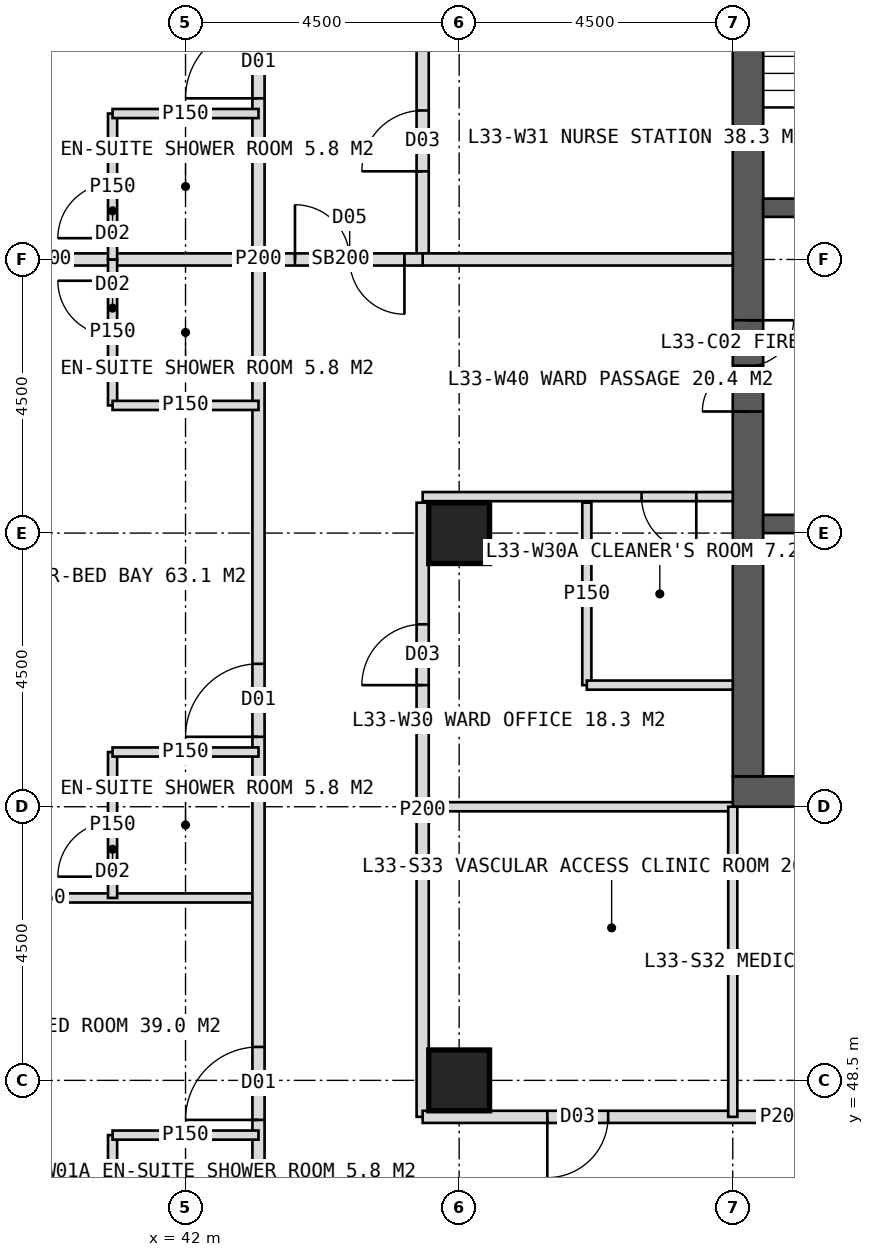
"""IFC4 building model, lengths in metres.
Left out: names, types, materials, properties, quantities, classifications, styles, units other than length and angle.
Written with IfcOpenShell. Run it as: python <this file> out.ifc"""

import sys

from ifc_helpers import new_model, si_unit, direction, frame, frame_2d, origin, origin_2d, place, context, subcontext, project, spatial, rectangle, hollow_rectangle, extrude, element, fill, save


model = new_model("IFC4")
c1 = context("Model", 3, precision=1e-05, world=origin(), true_north=direction((0.0, 1.0)))
c2 = subcontext(c1, "Body", "Model", "MODEL_VIEW")
j1 = project(units=[si_unit("LENGTHUNIT", "METRE"), si_unit("PLANEANGLEUNIT", "RADIAN")], contexts=[c1])
p1 = place(None, origin())
s1 = spatial("IfcSite", under=j1, at=p1, CompositionType="ELEMENT")
p2 = place(p1, origin())
s2 = spatial("IfcBuilding", under=s1, at=p2, CompositionType="ELEMENT")
p3 = place(p2, frame((0.0, 0.0, 140.0)))
s3 = spatial("IfcBuildingStorey", under=s2, at=p3, CompositionType="ELEMENT", Elevation=140.0)
p4 = place(p3, frame((51.0, 53.25, 0.0), z_axis=(0.0, 0.0, 1.0), x_axis=(1.0, 0.0, 0.0)))
e1 = element("IfcWall", 1, at=p4, inside=s3, PredefinedType="SHEAR", context=c2, shape_type="SweptSolid", body=[
    extrude(rectangle(XDim=18.0, YDim=0.5, at=frame_2d((9.0, 0.0))), origin(), (0.0, 0.0, 1.0), 4.0),
])
p5 = place(p4, frame((8.1, 0.0, 0.0)))
e2 = element("IfcOpeningElement", 2, at=p5, cuts=e1, PredefinedType="OPENING", context=c2, shape_type="SweptSolid", body=[
    extrude(rectangle(XDim=1.8, YDim=2.2, at=frame_2d((0.9, 1.1))), frame((0.0, 0.26, 0.0), z_axis=(0.0, -1.0, 0.0), x_axis=(1.0, 0.0, 0.0)), (0.0, 0.0, 1.0), 0.52),
])
p6 = place(p3, frame((51.25, 53.5, 0.0), z_axis=(0.0, 0.0, 1.0), x_axis=(0.0, 1.0, 0.0)))
e3 = element("IfcWall", 3, at=p6, inside=s3, PredefinedType="SHEAR", context=c2, shape_type="SweptSolid", body=[
    extrude(rectangle(XDim=17.0, YDim=0.5, at=frame_2d((8.5, 0.0))), origin(), (0.0, 0.0, 1.0), 4.0),
])
p7 = place(p6, frame((6.0, 0.0, 0.0)))
e4 = element("IfcOpeningElement", 4, at=p7, cuts=e3, PredefinedType="OPENING", context=c2, shape_type="SweptSolid", body=[
    extrude(rectangle(XDim=1.5, YDim=2.2, at=frame_2d((0.75, 1.1))), frame((0.0, 0.26, 0.0), z_axis=(0.0, -1.0, 0.0), x_axis=(1.0, 0.0, 0.0)), (0.0, 0.0, 1.0), 0.52),
])
p8 = place(p3, frame((51.5, 62.85, 0.0), z_axis=(0.0, 0.0, 1.0), x_axis=(1.0, 0.0, 0.0)))
e5 = element("IfcWall", 5, at=p8, inside=s3, PredefinedType="SHEAR", context=c2, shape_type="SweptSolid", body=[
    extrude(rectangle(XDim=3.3, YDim=0.3, at=frame_2d((1.65, 0.0))), origin(), (0.0, 0.0, 1.0), 4.0),
])
p9 = place(p8, frame((1.05, 0.0, 0.0)))
e6 = element("IfcOpeningElement", 6, at=p9, cuts=e5, PredefinedType="OPENING", context=c2, shape_type="SweptSolid", body=[
    extrude(rectangle(XDim=1.2, YDim=2.1, at=frame_2d((0.6, 1.05))), frame((0.0, 0.16, 0.0), z_axis=(0.0, -1.0, 0.0), x_axis=(1.0, 0.0, 0.0)), (0.0, 0.0, 1.0), 0.32),
])
p10 = place(p3, frame((51.5, 57.65, 0.0), z_axis=(0.0, 0.0, 1.0), x_axis=(1.0, 0.0, 0.0)))
e7 = element("IfcWall", 7, at=p10, inside=s3, PredefinedType="SHEAR", context=c2, shape_type="SweptSolid", body=[
    extrude(rectangle(XDim=3.3, YDim=0.3, at=frame_2d((1.65, 0.0))), origin(), (0.0, 0.0, 1.0), 4.0),
])
p11 = place(p10, frame((1.05, 0.0, 0.0)))
e8 = element("IfcOpeningElement", 8, at=p11, cuts=e7, PredefinedType="OPENING", context=c2, shape_type="SweptSolid", body=[
    extrude(rectangle(XDim=1.2, YDim=2.2, at=frame_2d((0.6, 1.1))), frame((0.0, 0.16, 0.0), z_axis=(0.0, -1.0, 0.0), x_axis=(1.0, 0.0, 0.0)), (0.0, 0.0, 1.0), 0.32),
])
for number, where, z_axis, x_axis in (
    (9, (46.5, 48.5, 0.0), (0.0, 0.0, 1.0), (1.0, 0.0, 0.0)),
    (10, (46.5, 57.5, 0.0), (0.0, 0.0, 1.0), (1.0, 0.0, 0.0)),
):
    element("IfcColumn", number, at=place(p3, frame(where, z_axis=z_axis, x_axis=x_axis)), inside=s3, PredefinedType="COLUMN", context=c2, shape_type="SweptSolid", body=[
        extrude(hollow_rectangle(XDim=1.0, YDim=1.0, WallThickness=0.1, at=origin_2d()), origin(), (0.0, 0.0, 1.0), 4.0),
    ])
p12 = place(p3, frame((43.2, 51.5, 0.0), z_axis=(0.0, 0.0, 1.0), x_axis=(-1.0, 0.0, 0.0)))
e11 = element("IfcWall", 11, at=p12, inside=s3, PredefinedType="PARTITIONING", context=c2, shape_type="SweptSolid", body=[
    extrude(rectangle(XDim=7.11, YDim=0.15, at=frame_2d((3.555, 0.0))), origin(), (0.0, 0.0, 1.0), 3.75),
])
p13 = place(p3, frame((43.2, 62.0, 0.0), z_axis=(0.0, 0.0, 1.0), x_axis=(-1.0, 0.0, 0.0)))
e12 = element("IfcWall", 12, at=p13, inside=s3, PredefinedType="SOLIDWALL", context=c2, shape_type="SweptSolid", body=[
    extrude(rectangle(XDim=7.11, YDim=0.2, at=frame_2d((3.555, 0.0))), origin(), (0.0, 0.0, 1.0), 2.95),
])
p14 = place(p3, frame((43.2, 45.2, 0.0), z_axis=(0.0, 0.0, 1.0), x_axis=(0.0, 1.0, 0.0)))
e13 = element("IfcWall", 13, at=p14, inside=s3, PredefinedType="PARTITIONING", context=c2, shape_type="SweptSolid", body=[
    extrude(rectangle(XDim=33.6, YDim=0.2, at=frame_2d((16.8, 0.0))), origin(), (0.0, 0.0, 1.0), 3.75),
])
p15 = place(p14, frame((2.65, 0.0, 0.0)))
e14 = element("IfcOpeningElement", 14, at=p15, cuts=e13, PredefinedType="OPENING", context=c2, shape_type="SweptSolid", body=[
    extrude(rectangle(XDim=1.2, YDim=2.2, at=frame_2d((0.6, 1.1))), frame((0.0, 0.11, 0.0), z_axis=(0.0, -1.0, 0.0), x_axis=(1.0, 0.0, 0.0)), (0.0, 0.0, 1.0), 0.22),
])
p16 = place(p14, frame((8.95, 0.0, 0.0)))
e15 = element("IfcOpeningElement", 15, at=p16, cuts=e13, PredefinedType="OPENING", context=c2, shape_type="SweptSolid", body=[
    extrude(rectangle(XDim=1.2, YDim=2.2, at=frame_2d((0.6, 1.1))), frame((0.0, 0.11, 0.0), z_axis=(0.0, -1.0, 0.0), x_axis=(1.0, 0.0, 0.0)), (0.0, 0.0, 1.0), 0.22),
])
p17 = place(p14, frame((19.45, 0.0, 0.0)))
e16 = element("IfcOpeningElement", 16, at=p17, cuts=e13, PredefinedType="OPENING", context=c2, shape_type="SweptSolid", body=[
    extrude(rectangle(XDim=1.2, YDim=2.2, at=frame_2d((0.6, 1.1))), frame((0.0, 0.11, 0.0), z_axis=(0.0, -1.0, 0.0), x_axis=(1.0, 0.0, 0.0)), (0.0, 0.0, 1.0), 0.22),
])
p18 = place(p14, frame((28.45, 0.0, 0.0)))
e17 = element("IfcOpeningElement", 17, at=p18, cuts=e13, PredefinedType="OPENING", context=c2, shape_type="SweptSolid", body=[
    extrude(rectangle(XDim=1.2, YDim=2.2, at=frame_2d((0.6, 1.1))), frame((0.0, 0.11, 0.0), z_axis=(0.0, -1.0, 0.0), x_axis=(1.0, 0.0, 0.0)), (0.0, 0.0, 1.0), 0.22),
])
p19 = place(p3, frame((40.8, 45.2, 0.0), z_axis=(0.0, 0.0, 1.0), x_axis=(0.0, 1.0, 0.0)))
e18 = element("IfcWall", 18, at=p19, inside=s3, PredefinedType="PARTITIONING", context=c2, shape_type="SweptSolid", body=[
    extrude(rectangle(XDim=2.4, YDim=0.15, at=frame_2d((1.2, 0.0))), origin(), (0.0, 0.0, 1.0), 2.997),
])
p20 = place(p19, frame((0.35, 0.0, 0.0)))
e19 = element("IfcOpeningElement", 19, at=p20, cuts=e18, PredefinedType="OPENING", context=c2, shape_type="SweptSolid", body=[
    extrude(rectangle(XDim=0.9, YDim=2.1, at=frame_2d((0.45, 1.05))), frame((0.0, 0.085, 0.0), z_axis=(0.0, -1.0, 0.0), x_axis=(1.0, 0.0, 0.0)), (0.0, 0.0, 1.0), 0.17),
])
p21 = place(p3, frame((43.2, 47.6, 0.0), z_axis=(0.0, 0.0, 1.0), x_axis=(-1.0, 0.0, 0.0)))
e20 = element("IfcWall", 20, at=p21, inside=s3, PredefinedType="PARTITIONING", context=c2, shape_type="SweptSolid", body=[
    extrude(rectangle(XDim=2.4, YDim=0.15, at=frame_2d((1.2, 0.0))), origin(), (0.0, 0.0, 1.0), 3.75),
])
p22 = place(p3, frame((40.8, 51.5, 0.0), z_axis=(0.0, 0.0, 1.0), x_axis=(0.0, 1.0, 0.0)))
e21 = element("IfcWall", 21, at=p22, inside=s3, PredefinedType="PARTITIONING", context=c2, shape_type="SweptSolid", body=[
    extrude(rectangle(XDim=2.4, YDim=0.15, at=frame_2d((1.2, 0.0))), origin(), (0.0, 0.0, 1.0), 3.75),
])
p23 = place(p22, frame((0.35, 0.0, 0.0)))
e22 = element("IfcOpeningElement", 22, at=p23, cuts=e21, PredefinedType="OPENING", context=c2, shape_type="SweptSolid", body=[
    extrude(rectangle(XDim=0.9, YDim=2.1, at=frame_2d((0.45, 1.05))), frame((0.0, 0.085, 0.0), z_axis=(0.0, -1.0, 0.0), x_axis=(1.0, 0.0, 0.0)), (0.0, 0.0, 1.0), 0.17),
])
p24 = place(p3, frame((43.2, 53.9, 0.0), z_axis=(0.0, 0.0, 1.0), x_axis=(-1.0, 0.0, 0.0)))
e23 = element("IfcWall", 23, at=p24, inside=s3, PredefinedType="PARTITIONING", context=c2, shape_type="SweptSolid", body=[
    extrude(rectangle(XDim=2.4, YDim=0.15, at=frame_2d((1.2, 0.0))), origin(), (0.0, 0.0, 1.0), 3.75),
])
p25 = place(p3, frame((40.8, 59.6, 0.0), z_axis=(0.0, 0.0, 1.0), x_axis=(0.0, 1.0, 0.0)))
e24 = element("IfcWall", 24, at=p25, inside=s3, PredefinedType="PARTITIONING", context=c2, shape_type="SweptSolid", body=[
    extrude(rectangle(XDim=2.4, YDim=0.15, at=frame_2d((1.2, 0.0))), origin(), (0.0, 0.0, 1.0), 3.75),
])
p26 = place(p25, frame((1.15, 0.0, 0.0)))
e25 = element("IfcOpeningElement", 25, at=p26, cuts=e24, PredefinedType="OPENING", context=c2, shape_type="SweptSolid", body=[
    extrude(rectangle(XDim=0.9, YDim=2.1, at=frame_2d((0.45, 1.05))), frame((0.0, 0.085, 0.0), z_axis=(0.0, -1.0, 0.0), x_axis=(1.0, 0.0, 0.0)), (0.0, 0.0, 1.0), 0.17),
])
p27 = place(p3, frame((43.2, 59.6, 0.0), z_axis=(0.0, 0.0, 1.0), x_axis=(-1.0, 0.0, 0.0)))
e26 = element("IfcWall", 26, at=p27, inside=s3, PredefinedType="PARTITIONING", context=c2, shape_type="SweptSolid", body=[
    extrude(rectangle(XDim=2.4, YDim=0.15, at=frame_2d((1.2, 0.0))), origin(), (0.0, 0.0, 1.0), 3.75),
])
p28 = place(p3, frame((40.8, 62.0, 0.0), z_axis=(0.0, 0.0, 1.0), x_axis=(0.0, 1.0, 0.0)))
e27 = element("IfcWall", 27, at=p28, inside=s3, PredefinedType="PARTITIONING", context=c2, shape_type="SweptSolid", body=[
    extrude(rectangle(XDim=2.4, YDim=0.15, at=frame_2d((1.2, 0.0))), origin(), (0.0, 0.0, 1.0), 3.75),
])
p29 = place(p28, frame((0.35, 0.0, 0.0)))
e28 = element("IfcOpeningElement", 28, at=p29, cuts=e27, PredefinedType="OPENING", context=c2, shape_type="SweptSolid", body=[
    extrude(rectangle(XDim=0.9, YDim=2.1, at=frame_2d((0.45, 1.05))), frame((0.0, 0.085, 0.0), z_axis=(0.0, -1.0, 0.0), x_axis=(1.0, 0.0, 0.0)), (0.0, 0.0, 1.0), 0.17),
])
p30 = place(p3, frame((43.2, 64.4, 0.0), z_axis=(0.0, 0.0, 1.0), x_axis=(-1.0, 0.0, 0.0)))
e29 = element("IfcWall", 29, at=p30, inside=s3, PredefinedType="PARTITIONING", context=c2, shape_type="SweptSolid", body=[
    extrude(rectangle(XDim=2.4, YDim=0.15, at=frame_2d((1.2, 0.0))), origin(), (0.0, 0.0, 1.0), 3.75),
])
p31 = place(p3, frame((51.0, 53.0, 0.0), z_axis=(0.0, 0.0, 1.0), x_axis=(-1.0, 0.0, 0.0)))
e30 = element("IfcWall", 30, at=p31, inside=s3, PredefinedType="PARTITIONING", context=c2, shape_type="SweptSolid", body=[
    extrude(rectangle(XDim=5.1, YDim=0.15, at=frame_2d((2.55, 0.0))), origin(), (0.0, 0.0, 1.0), 3.75),
])
p32 = place(p3, frame((45.9, 47.9, 0.0), z_axis=(0.0, 0.0, 1.0), x_axis=(0.0, 1.0, 0.0)))
e31 = element("IfcWall", 31, at=p32, inside=s3, PredefinedType="PARTITIONING", context=c2, shape_type="SweptSolid", body=[
    extrude(rectangle(XDim=10.1, YDim=0.2, at=frame_2d((5.05, 0.0))), origin(), (0.0, 0.0, 1.0), 3.75),
])
p33 = place(p32, frame((7.1, 0.0, 0.0)))
e32 = element("IfcOpeningElement", 32, at=p33, cuts=e31, PredefinedType="OPENING", context=c2, shape_type="SweptSolid", body=[
    extrude(rectangle(XDim=1.0, YDim=2.1, at=frame_2d((0.5, 1.05))), frame((0.0, 0.11, 0.0), z_axis=(0.0, -1.0, 0.0), x_axis=(1.0, 0.0, 0.0)), (0.0, 0.0, 1.0), 0.22),
])
p34 = place(p3, frame((45.9, 62.0, 0.0), z_axis=(0.0, 0.0, 1.0), x_axis=(0.0, 1.0, 0.0)))
e33 = element("IfcWall", 33, at=p34, inside=s3, PredefinedType="PARTITIONING", context=c2, shape_type="SweptSolid", body=[
    extrude(rectangle(XDim=14.1, YDim=0.2, at=frame_2d((7.05, 0.0))), origin(), (0.0, 0.0, 1.0), 3.75),
])
p35 = place(p34, frame((1.45, 0.0, 0.0)))
e34 = element("IfcOpeningElement", 34, at=p35, cuts=e33, PredefinedType="OPENING", context=c2, shape_type="SweptSolid", body=[
    extrude(rectangle(XDim=1.0, YDim=2.1, at=frame_2d((0.5, 1.05))), frame((0.0, 0.11, 0.0), z_axis=(0.0, -1.0, 0.0), x_axis=(1.0, 0.0, 0.0)), (0.0, 0.0, 1.0), 0.22),
])
p36 = place(p34, frame((10.3, 0.0, 0.0)))
e35 = element("IfcOpeningElement", 35, at=p36, cuts=e33, PredefinedType="OPENING", context=c2, shape_type="SweptSolid", body=[
    extrude(rectangle(XDim=1.0, YDim=2.1, at=frame_2d((0.5, 1.05))), frame((0.0, 0.11, 0.0), z_axis=(0.0, -1.0, 0.0), x_axis=(1.0, 0.0, 0.0)), (0.0, 0.0, 1.0), 0.22),
])
p37 = place(p3, frame((51.0, 58.1, 0.0), z_axis=(0.0, 0.0, 1.0), x_axis=(-1.0, 0.0, 0.0)))
e36 = element("IfcWall", 36, at=p37, inside=s3, PredefinedType="PARTITIONING", context=c2, shape_type="SweptSolid", body=[
    extrude(rectangle(XDim=5.1, YDim=0.15, at=frame_2d((2.55, 0.0))), origin(), (0.0, 0.0, 1.0), 3.75),
])
p38 = place(p37, frame((0.6, 0.0, 0.0)))
e37 = element("IfcOpeningElement", 37, at=p38, cuts=e36, PredefinedType="OPENING", context=c2, shape_type="SweptSolid", body=[
    extrude(rectangle(XDim=0.9, YDim=2.1, at=frame_2d((0.45, 1.05))), frame((0.0, 0.085, 0.0), z_axis=(0.0, -1.0, 0.0), x_axis=(1.0, 0.0, 0.0)), (0.0, 0.0, 1.0), 0.17),
])
p39 = place(p3, frame((51.0, 62.0, 0.0), z_axis=(0.0, 0.0, 1.0), x_axis=(-1.0, 0.0, 0.0)))
e38 = element("IfcWall", 38, at=p39, inside=s3, PredefinedType="SOLIDWALL", context=c2, shape_type="SweptSolid", body=[
    extrude(rectangle(XDim=5.1, YDim=0.2, at=frame_2d((2.55, 0.0))), origin(), (0.0, 0.0, 1.0), 2.95),
])
p40 = place(p3, frame((48.6, 55.0, 0.0), z_axis=(0.0, 0.0, 1.0), x_axis=(0.0, 1.0, 0.0)))
e39 = element("IfcWall", 39, at=p40, inside=s3, PredefinedType="PARTITIONING", context=c2, shape_type="SweptSolid", body=[
    extrude(rectangle(XDim=3.0, YDim=0.15, at=frame_2d((1.5, 0.0))), origin(), (0.0, 0.0, 1.0), 3.75),
])
p41 = place(p3, frame((51.0, 55.0, 0.0), z_axis=(0.0, 0.0, 1.0), x_axis=(-1.0, 0.0, 0.0)))
e40 = element("IfcWall", 40, at=p41, inside=s3, PredefinedType="PARTITIONING", context=c2, shape_type="SweptSolid", body=[
    extrude(rectangle(XDim=2.4, YDim=0.15, at=frame_2d((1.2, 0.0))), origin(), (0.0, 0.0, 1.0), 3.75),
])
p42 = place(p3, frame((57.75, 47.9, 0.0), z_axis=(0.0, 0.0, 1.0), x_axis=(-1.0, 0.0, 0.0)))
e41 = element("IfcWall", 41, at=p42, inside=s3, PredefinedType="PARTITIONING", context=c2, shape_type="SweptSolid", body=[
    extrude(rectangle(XDim=11.85, YDim=0.2, at=frame_2d((5.925, 0.0))), origin(), (0.0, 0.0, 1.0), 3.75),
])
p43 = place(p42, frame((0.325, 0.0, 0.0)))
e42 = element("IfcOpeningElement", 42, at=p43, cuts=e41, PredefinedType="OPENING", context=c2, shape_type="SweptSolid", body=[
    extrude(rectangle(XDim=1.0, YDim=2.1, at=frame_2d((0.5, 1.05))), frame((0.0, 0.11, 0.0), z_axis=(0.0, -1.0, 0.0), x_axis=(1.0, 0.0, 0.0)), (0.0, 0.0, 1.0), 0.22),
])
p44 = place(p42, frame((4.75, 0.0, 0.0)))
e43 = element("IfcOpeningElement", 43, at=p44, cuts=e41, PredefinedType="OPENING", context=c2, shape_type="SweptSolid", body=[
    extrude(rectangle(XDim=1.0, YDim=2.1, at=frame_2d((0.5, 1.05))), frame((0.0, 0.11, 0.0), z_axis=(0.0, -1.0, 0.0), x_axis=(1.0, 0.0, 0.0)), (0.0, 0.0, 1.0), 0.22),
])
p45 = place(p42, frame((8.8, 0.0, 0.0)))
e44 = element("IfcOpeningElement", 44, at=p45, cuts=e41, PredefinedType="OPENING", context=c2, shape_type="SweptSolid", body=[
    extrude(rectangle(XDim=1.0, YDim=2.1, at=frame_2d((0.5, 1.05))), frame((0.0, 0.11, 0.0), z_axis=(0.0, -1.0, 0.0), x_axis=(1.0, 0.0, 0.0)), (0.0, 0.0, 1.0), 0.22),
])
p46 = place(p3, frame((51.0, 53.0, 0.0), z_axis=(0.0, 0.0, 1.0), x_axis=(0.0, -1.0, 0.0)))
e45 = element("IfcWall", 45, at=p46, inside=s3, PredefinedType="PARTITIONING", context=c2, shape_type="SweptSolid", body=[
    extrude(rectangle(XDim=5.1, YDim=0.15, at=frame_2d((2.55, 0.0))), origin(), (0.0, 0.0, 1.0), 3.75),
])
p47 = place(p3, frame((45.9, 62.0, 0.0), z_axis=(0.0, 0.0, 1.0), x_axis=(-1.0, 0.0, 0.0)))
e46 = element("IfcWall", 46, at=p47, inside=s3, PredefinedType="SOLIDWALL", context=c2, shape_type="SweptSolid", body=[
    extrude(rectangle(XDim=2.7, YDim=0.2, at=frame_2d((1.35, 0.0))), origin(), (0.0, 0.0, 1.0), 2.95),
])
p48 = place(p47, frame((0.3, 0.0, 0.0)))
e47 = element("IfcOpeningElement", 47, at=p48, cuts=e46, PredefinedType="OPENING", context=c2, shape_type="SweptSolid", body=[
    extrude(rectangle(XDim=1.8, YDim=2.2, at=frame_2d((0.9, 1.1))), frame((0.0, 0.11, 0.0), z_axis=(0.0, -1.0, 0.0), x_axis=(1.0, 0.0, 0.0)), (0.0, 0.0, 1.0), 0.22),
])
p49 = place(p15, origin())
e48 = element("IfcDoor", 48, at=p49, inside=s3, OperationType="SINGLE_SWING_LEFT", PredefinedType="DOOR", context=c2, shape_type="SweptSolid", body=[
    extrude(rectangle(XDim=1.2, YDim=2.2, at=frame_2d((0.6, 1.1))), frame((0.0, 0.025, 0.0), z_axis=(0.0, -1.0, 0.0), x_axis=(1.0, 0.0, 0.0)), (0.0, 0.0, 1.0), 0.05),
])
fill(e14, e48)
p50 = place(p16, origin())
e49 = element("IfcDoor", 49, at=p50, inside=s3, OperationType="SINGLE_SWING_LEFT", PredefinedType="DOOR", context=c2, shape_type="SweptSolid", body=[
    extrude(rectangle(XDim=1.2, YDim=2.2, at=frame_2d((0.6, 1.1))), frame((0.0, 0.025, 0.0), z_axis=(0.0, -1.0, 0.0), x_axis=(1.0, 0.0, 0.0)), (0.0, 0.0, 1.0), 0.05),
])
fill(e15, e49)
p51 = place(p23, origin())
e50 = element("IfcDoor", 50, at=p51, inside=s3, OperationType="SINGLE_SWING_LEFT", PredefinedType="DOOR", context=c2, shape_type="SweptSolid", body=[
    extrude(rectangle(XDim=0.9, YDim=2.1, at=frame_2d((0.45, 1.05))), frame((0.0, 0.025, 0.0), z_axis=(0.0, -1.0, 0.0), x_axis=(1.0, 0.0, 0.0)), (0.0, 0.0, 1.0), 0.05),
])
fill(e22, e50)
p52 = place(p26, origin())
e51 = element("IfcDoor", 51, at=p52, inside=s3, OperationType="SINGLE_SWING_RIGHT", PredefinedType="DOOR", context=c2, shape_type="SweptSolid", body=[
    extrude(rectangle(XDim=0.9, YDim=2.1, at=frame_2d((0.45, 1.05))), frame((0.0, 0.025, 0.0), z_axis=(0.0, -1.0, 0.0), x_axis=(1.0, 0.0, 0.0)), (0.0, 0.0, 1.0), 0.05),
])
fill(e25, e51)
p53 = place(p17, origin())
e52 = element("IfcDoor", 52, at=p53, inside=s3, OperationType="SINGLE_SWING_LEFT", PredefinedType="DOOR", context=c2, shape_type="SweptSolid", body=[
    extrude(rectangle(XDim=1.2, YDim=2.2, at=frame_2d((0.6, 1.1))), frame((0.0, 0.025, 0.0), z_axis=(0.0, -1.0, 0.0), x_axis=(1.0, 0.0, 0.0)), (0.0, 0.0, 1.0), 0.05),
])
fill(e16, e52)
p54 = place(p29, origin())
e53 = element("IfcDoor", 53, at=p54, inside=s3, OperationType="SINGLE_SWING_LEFT", PredefinedType="DOOR", context=c2, shape_type="SweptSolid", body=[
    extrude(rectangle(XDim=0.9, YDim=2.1, at=frame_2d((0.45, 1.05))), frame((0.0, 0.025, 0.0), z_axis=(0.0, -1.0, 0.0), x_axis=(1.0, 0.0, 0.0)), (0.0, 0.0, 1.0), 0.05),
])
fill(e28, e53)
p55 = place(p38, origin())
e54 = element("IfcDoor", 54, at=p55, inside=s3, OperationType="SINGLE_SWING_LEFT", PredefinedType="DOOR", context=c2, shape_type="SweptSolid", body=[
    extrude(rectangle(XDim=0.9, YDim=2.1, at=frame_2d((0.45, 1.05))), frame((0.0, 0.025, 0.0), z_axis=(0.0, -1.0, 0.0), x_axis=(1.0, 0.0, 0.0)), (0.0, 0.0, 1.0), 0.05),
])
fill(e37, e54)
p56 = place(p33, origin())
e55 = element("IfcDoor", 55, at=p56, inside=s3, OperationType="SINGLE_SWING_LEFT", PredefinedType="DOOR", context=c2, shape_type="SweptSolid", body=[
    extrude(rectangle(XDim=1.0, YDim=2.1, at=frame_2d((0.5, 1.05))), frame((0.0, 0.025, 0.0), z_axis=(0.0, -1.0, 0.0), x_axis=(1.0, 0.0, 0.0)), (0.0, 0.0, 1.0), 0.05),
])
fill(e32, e55)
p57 = place(p35, origin())
e56 = element("IfcDoor", 56, at=p57, inside=s3, OperationType="SINGLE_SWING_LEFT", PredefinedType="DOOR", context=c2, shape_type="SweptSolid", body=[
    extrude(rectangle(XDim=1.0, YDim=2.1, at=frame_2d((0.5, 1.05))), frame((0.0, 0.025, 0.0), z_axis=(0.0, -1.0, 0.0), x_axis=(1.0, 0.0, 0.0)), (0.0, 0.0, 1.0), 0.05),
])
fill(e34, e56)
p58 = place(p45, origin())
e57 = element("IfcDoor", 57, at=p58, inside=s3, OperationType="SINGLE_SWING_RIGHT", PredefinedType="DOOR", context=c2, shape_type="SweptSolid", body=[
    extrude(rectangle(XDim=1.0, YDim=2.1, at=frame_2d((0.5, 1.05))), frame((0.0, 0.025, 0.0), z_axis=(0.0, -1.0, 0.0), x_axis=(1.0, 0.0, 0.0)), (0.0, 0.0, 1.0), 0.05),
])
fill(e44, e57)
p59 = place(p48, origin())
e58 = element("IfcDoor", 58, at=p59, inside=s3, OperationType="DOUBLE_DOOR_DOUBLE_SWING", PredefinedType="DOOR", context=c2, shape_type="SweptSolid", body=[
    extrude(rectangle(XDim=1.8, YDim=2.2, at=frame_2d((0.9, 1.1))), frame((0.0, 0.025, 0.0), z_axis=(0.0, -1.0, 0.0), x_axis=(1.0, 0.0, 0.0)), (0.0, 0.0, 1.0), 0.05),
])
fill(e47, e58)
p60 = place(p7, origin())
e59 = element("IfcDoor", 59, at=p60, inside=s3, OperationType="DOUBLE_DOOR_SINGLE_SWING", PredefinedType="DOOR", context=c2, shape_type="SweptSolid", body=[
    extrude(rectangle(XDim=1.5, YDim=2.2, at=frame_2d((0.75, 1.1))), frame((0.0, 0.025, 0.0), z_axis=(0.0, -1.0, 0.0), x_axis=(1.0, 0.0, 0.0)), (0.0, 0.0, 1.0), 0.05),
])
fill(e4, e59)
save(model, sys.argv[1])
